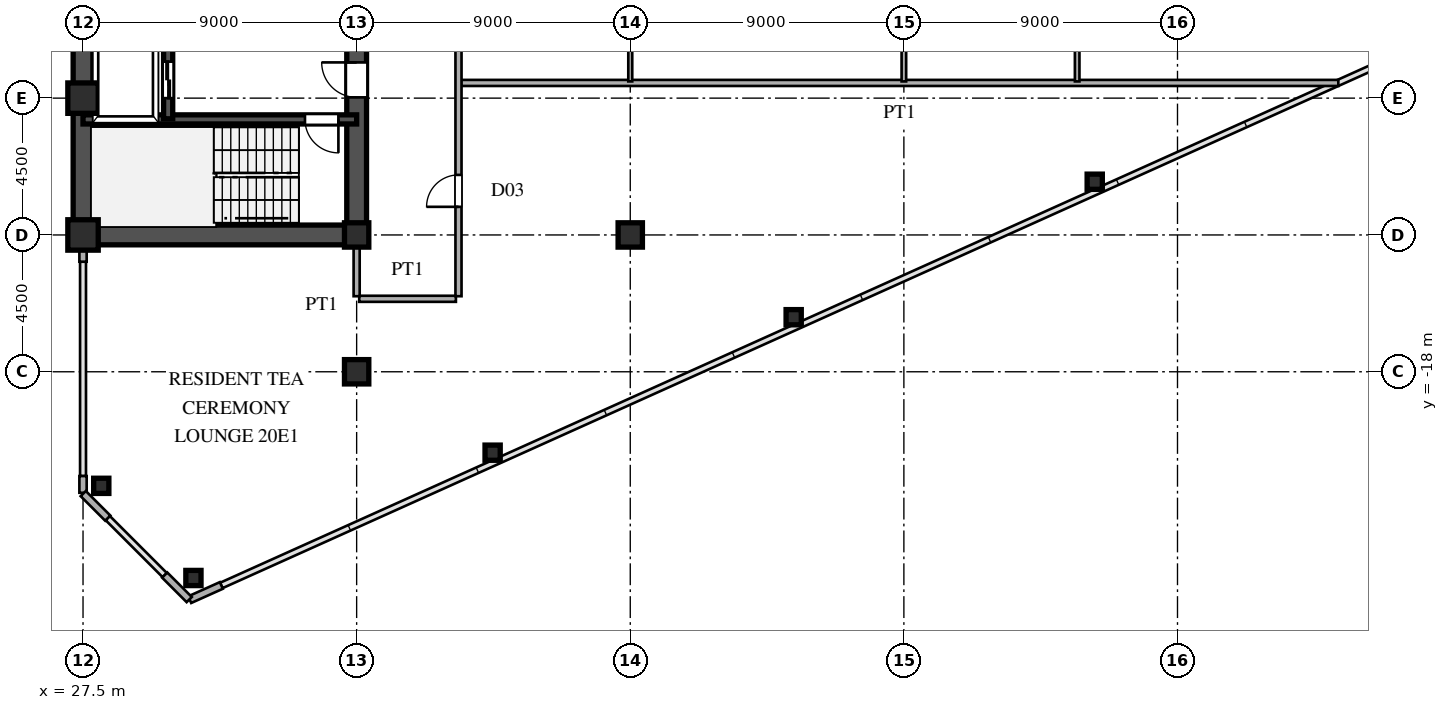
"""IFC4 building model, lengths in metres.
Left out: names, types, materials, properties, quantities, classifications, styles, units other than length and angle.
Written with IfcOpenShell. Run it as: python <this file> out.ifc"""

import sys

from ifc_helpers import new_model, si_unit, direction, frame, frame_2d, origin, origin_2d, place, context, subcontext, project, spatial, rectangle, hollow_rectangle, i_section, extrude, source, transform, mapped, element, fill, save


model = new_model("IFC4")
c1 = context("Model", 3, precision=1e-05, world=origin(), true_north=direction((0.0, 1.0)))
c2 = subcontext(c1, "Body", "Model", "MODEL_VIEW")
j1 = project(units=[si_unit("LENGTHUNIT", "METRE"), si_unit("PLANEANGLEUNIT", "RADIAN")], contexts=[c1])
p1 = place(None, origin())
s1 = spatial("IfcSite", under=j1, at=p1, CompositionType="ELEMENT")
p2 = place(p1, origin())
s2 = spatial("IfcBuilding", under=s1, at=p2, CompositionType="ELEMENT")
p3 = place(p2, frame((0.0, 0.0, 76.5)))
s3 = spatial("IfcBuildingStorey", under=s2, at=p3, CompositionType="ELEMENT", Elevation=76.5)
m1 = source(origin(), c2, "Body", "SweptSolid", [
    extrude(hollow_rectangle(XDim=1.0, YDim=1.0, WallThickness=0.042, at=origin_2d()), origin(), (0.0, 0.0, 1.0), 3.6),
])
for number, where, z_axis, x_axis in (
    (1, (27.5, -13.5, 0.0), (0.0, 0.0, 1.0), (1.0, 0.0, 0.0)),
    (2, (27.5, -9.0, 0.0), (0.0, 0.0, 1.0), (1.0, 0.0, 0.0)),
):
    element("IfcColumn", number, at=place(p3, frame(where, z_axis=z_axis, x_axis=x_axis)), inside=s3, PredefinedType="COLUMN", context=c2, shape_type="MappedRepresentation", body=[
        mapped(m1, transform((0.0, 0.0, 0.0), scale=1.0)),
    ])
m2 = source(origin(), c2, "Body", "SweptSolid", [
    extrude(i_section(OverallWidth=0.8, OverallDepth=0.8, WebThickness=0.032, FlangeThickness=0.05, at=origin_2d()), origin(), (0.0, 0.0, 1.0), 3.6),
])
for number, where, z_axis, x_axis in (
    (3, (36.5, -18.0, 0.0), (0.0, 0.0, 1.0), (1.0, 0.0, 0.0)),
    (4, (36.5, -13.5, 0.0), (0.0, 0.0, 1.0), (1.0, 0.0, 0.0)),
    (5, (45.5, -13.5, 0.0), (0.0, 0.0, 1.0), (1.0, 0.0, 0.0)),
):
    element("IfcColumn", number, at=place(p3, frame(where, z_axis=z_axis, x_axis=x_axis)), inside=s3, PredefinedType="COLUMN", context=c2, shape_type="MappedRepresentation", body=[
        mapped(m2, transform((0.0, 0.0, 0.0), scale=1.0)),
    ])
m3 = source(origin(), c2, "Body", "SweptSolid", [
    extrude(hollow_rectangle(XDim=0.5, YDim=0.5, WallThickness=0.02, at=origin_2d()), origin(), (0.0, 0.0, 1.0), 3.6),
])
for number, where, z_axis, x_axis in (
    (6, (31.131, -24.783, 0.0), (0.0, 0.0, 1.0), (1.0, 0.0, 0.0)),
    (7, (28.1, -21.751, 0.0), (0.0, 0.0, 1.0), (1.0, 0.0, 0.0)),
    (8, (40.973, -20.661, 0.0), (0.0, 0.0, 1.0), (1.0, 0.0, 0.0)),
    (9, (50.875, -16.205, 0.0), (0.0, 0.0, 1.0), (1.0, 0.0, 0.0)),
    (10, (60.778, -11.749, 0.0), (0.0, 0.0, 1.0), (1.0, 0.0, 0.0)),
):
    element("IfcColumn", number, at=place(p3, frame(where, z_axis=z_axis, x_axis=x_axis)), inside=s3, PredefinedType="COLUMN", context=c2, shape_type="MappedRepresentation", body=[
        mapped(m3, transform((0.0, 0.0, 0.0), scale=1.0)),
    ])
p4 = place(p3, frame((31.009, -25.496, 0.0), z_axis=(0.0, 0.0, 1.0), x_axis=(0.911929519623, 0.410346866979, 0.0)))
e11 = element("IfcWall", 11, at=p4, inside=s3, PredefinedType="SOLIDWALL", context=c2, shape_type="SweptSolid", body=[
    extrude(rectangle(XDim=1.14, YDim=0.24, at=frame_2d((0.57, 0.0))), origin(), (0.0, 0.0, 1.0), 3.38),
])
p5 = place(p3, frame((27.5, -21.98, 0.0), z_axis=(0.0, 0.0, 1.0), x_axis=(0.0, 1.0, 0.0)))
e12 = element("IfcWall", 12, at=p5, inside=s3, PredefinedType="SOLIDWALL", context=c2, shape_type="SweptSolid", body=[
    extrude(rectangle(XDim=0.55, YDim=0.24, at=frame_2d((0.275, 0.0))), origin(), (0.0, 0.0, 1.0), 3.38),
])
p6 = place(p3, frame((27.5, -14.38, 0.0), z_axis=(0.0, 0.0, 1.0), x_axis=(0.0, 1.0, 0.0)))
e13 = element("IfcWall", 13, at=p6, inside=s3, PredefinedType="SOLIDWALL", context=c2, shape_type="SweptSolid", body=[
    extrude(rectangle(XDim=0.55, YDim=0.24, at=frame_2d((0.275, 0.0))), origin(), (0.0, 0.0, 1.0), 2.88),
])
for number, where, z_axis, x_axis in (
    (14, (27.507, -22.007, 0.0), (0.0, 0.0, 1.0), (0.707, -0.707, 0.0)),
    (15, (30.187, -24.687, 0.0), (0.0, 0.0, 1.0), (0.707, -0.707, 0.0)),
):
    element("IfcWall", number, at=place(p3, frame(where, z_axis=z_axis, x_axis=x_axis)), inside=s3, PredefinedType="SOLIDWALL", context=c2, shape_type="SweptSolid", body=[
        extrude(rectangle(XDim=1.14, YDim=0.24, at=frame_2d((0.57, 0.0))), origin(), (0.0, 0.0, 1.0), 3.38),
    ])
p7 = place(p3, frame((27.5, -13.5, 0.0), z_axis=(0.0, 0.0, 1.0), x_axis=(0.0, 1.0, 0.0)))
e16 = element("IfcWall", 16, at=p7, inside=s3, PredefinedType="SHEAR", context=c2, shape_type="SweptSolid", body=[
    extrude(rectangle(XDim=12.2, YDim=0.65, at=frame_2d((6.1, 0.0))), origin(), (0.0, 0.0, 1.0), 3.38),
])
p8 = place(p3, frame((27.5, -13.5, 0.0), z_axis=(0.0, 0.0, 1.0), x_axis=(1.0, 0.0, 0.0)))
e17 = element("IfcWall", 17, at=p8, inside=s3, PredefinedType="SHEAR", context=c2, shape_type="SweptSolid", body=[
    extrude(rectangle(XDim=9.0, YDim=0.65, at=frame_2d((4.5, 0.0))), origin(), (0.0, 0.0, 1.0), 3.38),
])
p9 = place(p3, frame((36.5, -13.65, 0.0), z_axis=(0.0, 0.0, 1.0), x_axis=(0.0, 1.0, 0.0)))
e18 = element("IfcWall", 18, at=p9, inside=s3, PredefinedType="SHEAR", context=c2, shape_type="SweptSolid", body=[
    extrude(rectangle(XDim=7.15, YDim=0.65, at=frame_2d((3.575, 0.0))), origin(), (0.0, 0.0, 1.0), 3.38),
])
p10 = place(p9, frame((4.675, 0.0, 0.0)))
e19 = element("IfcOpeningElement", 19, at=p10, cuts=e18, PredefinedType="OPENING", context=c2, shape_type="SweptSolid", body=[
    extrude(rectangle(XDim=1.15, YDim=2.2, at=frame_2d((0.575, 1.1))), frame((0.0, 0.335, 0.0), z_axis=(0.0, -1.0, 0.0), x_axis=(1.0, 0.0, 0.0)), (0.0, 0.0, 1.0), 0.67),
])
p11 = place(p3, frame((27.5, -9.7, 0.0), z_axis=(0.0, 0.0, 1.0), x_axis=(1.0, 0.0, 0.0)))
e20 = element("IfcWall", 20, at=p11, inside=s3, PredefinedType="SHEAR", context=c2, shape_type="SweptSolid", body=[
    extrude(rectangle(XDim=9.0, YDim=0.3, at=frame_2d((4.5, 0.0))), origin(), (0.0, 0.0, 1.0), 3.38),
])
p12 = place(p11, frame((7.3, 0.0, 0.0)))
e21 = element("IfcOpeningElement", 21, at=p12, cuts=e20, PredefinedType="OPENING", context=c2, shape_type="SweptSolid", body=[
    extrude(rectangle(XDim=1.1, YDim=2.2, at=frame_2d((0.55, 1.1))), frame((0.0, 0.16, 0.0), z_axis=(0.0, -1.0, 0.0), x_axis=(1.0, 0.0, 0.0)), (0.0, 0.0, 1.0), 0.32),
])
p13 = place(p3, frame((30.3, -9.68, 0.0), z_axis=(0.0, 0.0, 1.0), x_axis=(0.0, 1.0, 0.0)))
e22 = element("IfcWall", 22, at=p13, inside=s3, PredefinedType="SHEAR", context=c2, shape_type="SweptSolid", body=[
    extrude(rectangle(XDim=2.56, YDim=0.3, at=frame_2d((1.28, 0.0))), origin(), (0.0, 0.0, 1.0), 3.38),
])
p14 = place(p13, frame((0.68, 0.0, 0.0)))
e23 = element("IfcOpeningElement", 23, at=p14, cuts=e22, PredefinedType="OPENING", context=c2, shape_type="SweptSolid", body=[
    extrude(rectangle(XDim=1.2, YDim=2.25, at=frame_2d((0.6, 1.125))), frame((0.0, 0.16, 0.0), z_axis=(0.0, -1.0, 0.0), x_axis=(1.0, 0.0, 0.0)), (0.0, 0.0, 1.0), 0.32),
])
p15 = place(p3, frame((36.585, -15.6, 0.0), z_axis=(0.0, 0.0, 1.0), x_axis=(1.0, 0.0, 0.0)))
e24 = element("IfcWall", 24, at=p15, inside=s3, PredefinedType="PARTITIONING", context=c2, shape_type="SweptSolid", body=[
    extrude(rectangle(XDim=3.18, YDim=0.2, at=frame_2d((1.59, 0.0))), origin(), (0.0, 0.0, 1.0), 3.38),
])
p16 = place(p3, frame((39.93, -8.5, 0.0), z_axis=(0.0, 0.0, 1.0), x_axis=(1.0, 0.0, 0.0)))
e25 = element("IfcWall", 25, at=p16, inside=s3, PredefinedType="PARTITIONING", context=c2, shape_type="SweptSolid", body=[
    extrude(rectangle(XDim=28.86, YDim=0.2, at=frame_2d((14.43, 0.0))), origin(), (0.0, 0.0, 1.0), 3.38),
])
p17 = place(p3, frame((36.5, -15.515, 0.0), z_axis=(0.0, 0.0, 1.0), x_axis=(0.0, 1.0, 0.0)))
e26 = element("IfcWall", 26, at=p17, inside=s3, PredefinedType="PARTITIONING", context=c2, shape_type="SweptSolid", body=[
    extrude(rectangle(XDim=1.685, YDim=0.2, at=frame_2d((0.842, 0.0))), origin(), (0.0, 0.0, 1.0), 2.68),
])
p18 = place(p3, frame((39.85, -15.515, 0.0), z_axis=(0.0, 0.0, 1.0), x_axis=(0.0, 1.0, 0.0)))
e27 = element("IfcWall", 27, at=p18, inside=s3, PredefinedType="PARTITIONING", context=c2, shape_type="SweptSolid", body=[
    extrude(rectangle(XDim=31.03, YDim=0.2, at=frame_2d((15.515, 0.0))), origin(), (0.0, 0.0, 1.0), 3.38),
])
p19 = place(p18, frame((2.94, 0.0, 0.0)))
e28 = element("IfcOpeningElement", 28, at=p19, cuts=e27, PredefinedType="OPENING", context=c2, shape_type="SweptSolid", body=[
    extrude(rectangle(XDim=1.05, YDim=2.25, at=frame_2d((0.525, 1.125))), frame((0.0, 0.11, 0.0), z_axis=(0.0, -1.0, 0.0), x_axis=(1.0, 0.0, 0.0)), (0.0, 0.0, 1.0), 0.22),
])
p20 = place(p18, frame((13.28, 0.0, 0.0)))
e29 = element("IfcOpeningElement", 29, at=p20, cuts=e27, PredefinedType="OPENING", context=c2, shape_type="SweptSolid", body=[
    extrude(rectangle(XDim=1.05, YDim=2.25, at=frame_2d((0.525, 1.125))), frame((0.0, 0.11, 0.0), z_axis=(0.0, -1.0, 0.0), x_axis=(1.0, 0.0, 0.0)), (0.0, 0.0, 1.0), 0.22),
])
p21 = place(p18, frame((25.567, 0.0, 0.0)))
e30 = element("IfcOpeningElement", 30, at=p21, cuts=e27, PredefinedType="OPENING", context=c2, shape_type="SweptSolid", body=[
    extrude(rectangle(XDim=1.05, YDim=2.25, at=frame_2d((0.525, 1.125))), frame((0.0, 0.11, 0.0), z_axis=(0.0, -1.0, 0.0), x_axis=(1.0, 0.0, 0.0)), (0.0, 0.0, 1.0), 0.22),
])
p22 = place(p3, frame((45.5, -8.45, 0.0), z_axis=(0.0, 0.0, 1.0), x_axis=(0.0, 1.0, 0.0)))
e31 = element("IfcWall", 31, at=p22, inside=s3, PredefinedType="PARTITIONING", context=c2, shape_type="SweptSolid", body=[
    extrude(rectangle(XDim=9.233, YDim=0.13, at=frame_2d((4.616, 0.0))), origin(), (0.0, 0.0, 1.0), 2.68),
])
p23 = place(p22, frame((6.475, 0.0, 0.0)))
e32 = element("IfcOpeningElement", 32, at=p23, cuts=e31, PredefinedType="OPENING", context=c2, shape_type="SweptSolid", body=[
    extrude(rectangle(XDim=0.95, YDim=2.15, at=frame_2d((0.475, 1.075))), frame((0.0, 0.075, 0.0), z_axis=(0.0, -1.0, 0.0), x_axis=(1.0, 0.0, 0.0)), (0.0, 0.0, 1.0), 0.15),
])
p24 = place(p3, frame((54.5, -8.45, 0.0), z_axis=(0.0, 0.0, 1.0), x_axis=(0.0, 1.0, 0.0)))
e33 = element("IfcWall", 33, at=p24, inside=s3, PredefinedType="PARTITIONING", context=c2, shape_type="SweptSolid", body=[
    extrude(rectangle(XDim=22.883, YDim=0.15, at=frame_2d((11.441, 0.0))), origin(), (0.0, 0.0, 1.0), 2.68),
])
p25 = place(p24, frame((6.475, 0.0, 0.0)))
e34 = element("IfcOpeningElement", 34, at=p25, cuts=e33, PredefinedType="OPENING", context=c2, shape_type="SweptSolid", body=[
    extrude(rectangle(XDim=0.95, YDim=2.15, at=frame_2d((0.475, 1.075))), frame((0.0, 0.085, 0.0), z_axis=(0.0, -1.0, 0.0), x_axis=(1.0, 0.0, 0.0)), (0.0, 0.0, 1.0), 0.17),
])
p26 = place(p24, frame((20.212, 0.0, 0.0)))
e35 = element("IfcOpeningElement", 35, at=p26, cuts=e33, PredefinedType="OPENING", context=c2, shape_type="SweptSolid", body=[
    extrude(rectangle(XDim=0.95, YDim=2.15, at=frame_2d((0.475, 1.075))), frame((0.0, 0.085, 0.0), z_axis=(0.0, -1.0, 0.0), x_axis=(1.0, 0.0, 0.0)), (0.0, 0.0, 1.0), 0.17),
])
p27 = place(p24, frame((15.721, 0.0, 0.0)))
e36 = element("IfcOpeningElement", 36, at=p27, cuts=e33, PredefinedType="OPENING", context=c2, shape_type="SweptSolid", body=[
    extrude(rectangle(XDim=0.95, YDim=2.15, at=frame_2d((0.475, 1.075))), frame((0.0, 0.085, 0.0), z_axis=(0.0, -1.0, 0.0), x_axis=(1.0, 0.0, 0.0)), (0.0, 0.0, 1.0), 0.17),
])
p28 = place(p3, frame((60.2, -8.45, 0.0), z_axis=(0.0, 0.0, 1.0), x_axis=(0.0, 1.0, 0.0)))
e37 = element("IfcWall", 37, at=p28, inside=s3, PredefinedType="PARTITIONING", context=c2, shape_type="SweptSolid", body=[
    extrude(rectangle(XDim=18.392, YDim=0.15, at=frame_2d((9.196, 0.0))), origin(), (0.0, 0.0, 1.0), 3.38),
])
p29 = place(p28, frame((1.808, 0.0, 0.0)))
e38 = element("IfcOpeningElement", 38, at=p29, cuts=e37, PredefinedType="OPENING", context=c2, shape_type="SweptSolid", body=[
    extrude(rectangle(XDim=0.95, YDim=2.15, at=frame_2d((0.475, 1.075))), frame((0.0, 0.085, 0.0), z_axis=(0.0, -1.0, 0.0), x_axis=(1.0, 0.0, 0.0)), (0.0, 0.0, 1.0), 0.17),
])
p30 = place(p28, frame((6.475, 0.0, 0.0)))
e39 = element("IfcOpeningElement", 39, at=p30, cuts=e37, PredefinedType="OPENING", context=c2, shape_type="SweptSolid", body=[
    extrude(rectangle(XDim=0.95, YDim=2.15, at=frame_2d((0.475, 1.075))), frame((0.0, 0.085, 0.0), z_axis=(0.0, -1.0, 0.0), x_axis=(1.0, 0.0, 0.0)), (0.0, 0.0, 1.0), 0.17),
])
p31 = place(p28, frame((11.142, 0.0, 0.0)))
e40 = element("IfcOpeningElement", 40, at=p31, cuts=e37, PredefinedType="OPENING", context=c2, shape_type="SweptSolid", body=[
    extrude(rectangle(XDim=0.95, YDim=2.15, at=frame_2d((0.475, 1.075))), frame((0.0, 0.085, 0.0), z_axis=(0.0, -1.0, 0.0), x_axis=(1.0, 0.0, 0.0)), (0.0, 0.0, 1.0), 0.17),
])
p32 = place(p28, frame((15.721, 0.0, 0.0)))
e41 = element("IfcOpeningElement", 41, at=p32, cuts=e37, PredefinedType="OPENING", context=c2, shape_type="SweptSolid", body=[
    extrude(rectangle(XDim=0.95, YDim=2.15, at=frame_2d((0.475, 1.075))), frame((0.0, 0.085, 0.0), z_axis=(0.0, -1.0, 0.0), x_axis=(1.0, 0.0, 0.0)), (0.0, 0.0, 1.0), 0.17),
])
m4 = source(origin(), c2, "Body", "SweptSolid", [
    extrude(rectangle(XDim=1.15, YDim=2.2, at=frame_2d((0.575, 1.1))), frame((0.0, 0.025, 0.0), z_axis=(0.0, -1.0, 0.0), x_axis=(1.0, 0.0, 0.0)), (0.0, 0.0, 1.0), 0.05),
])
p33 = place(p10, origin())
e42 = element("IfcDoor", 42, at=p33, inside=s3, OperationType="SINGLE_SWING_RIGHT", PredefinedType="DOOR", context=c2, shape_type="MappedRepresentation", body=[
    mapped(m4, transform((0.0, 0.0, 0.0), scale=1.0)),
])
fill(e19, e42)
m5 = source(origin(), c2, "Body", "SweptSolid", [
    extrude(rectangle(XDim=1.1, YDim=2.2, at=frame_2d((0.55, 1.1))), frame((0.0, 0.025, 0.0), z_axis=(0.0, -1.0, 0.0), x_axis=(1.0, 0.0, 0.0)), (0.0, 0.0, 1.0), 0.05),
])
p34 = place(p12, frame((1.1, 0.0, 0.0), z_axis=(0.0, 0.0, 1.0), x_axis=(-1.0, 0.0, 0.0)))
e43 = element("IfcDoor", 43, at=p34, inside=s3, OperationType="SINGLE_SWING_RIGHT", PredefinedType="DOOR", context=c2, shape_type="MappedRepresentation", body=[
    mapped(m5, transform((0.0, 0.0, 0.0), scale=1.0)),
])
fill(e21, e43)
m6 = source(origin(), c2, "Body", "SweptSolid", [
    extrude(rectangle(XDim=1.2, YDim=2.25, at=frame_2d((0.6, 1.125))), frame((0.0, 0.025, 0.0), z_axis=(0.0, -1.0, 0.0), x_axis=(1.0, 0.0, 0.0)), (0.0, 0.0, 1.0), 0.05),
])
p35 = place(p14, origin())
e44 = element("IfcDoor", 44, at=p35, inside=s3, OperationType="DOUBLE_DOOR_SLIDING", PredefinedType="DOOR", context=c2, shape_type="MappedRepresentation", body=[
    mapped(m6, transform((0.0, 0.0, 0.0), scale=1.0)),
])
fill(e23, e44)
m7 = source(origin(), c2, "Body", "SweptSolid", [
    extrude(rectangle(XDim=1.05, YDim=2.25, at=frame_2d((0.525, 1.125))), frame((0.0, 0.025, 0.0), z_axis=(0.0, -1.0, 0.0), x_axis=(1.0, 0.0, 0.0)), (0.0, 0.0, 1.0), 0.05),
])
p36 = place(p19, origin())
e45 = element("IfcDoor", 45, at=p36, inside=s3, OperationType="SINGLE_SWING_LEFT", PredefinedType="DOOR", context=c2, shape_type="MappedRepresentation", body=[
    mapped(m7, transform((0.0, 0.0, 0.0), scale=1.0)),
])
fill(e28, e45)
save(model, sys.argv[1])
